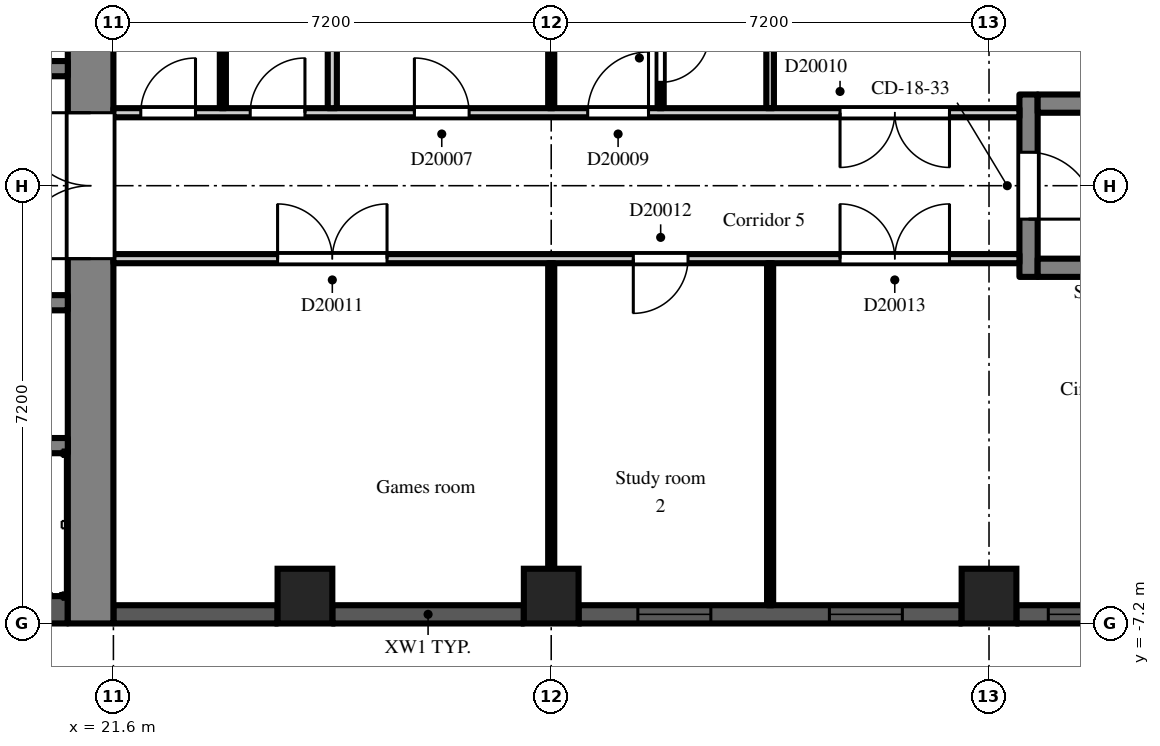
"""IFC4 building model, lengths in metres.
Left out: names, types, materials, properties, quantities, classifications, styles, units other than length and angle.
Written with IfcOpenShell. Run it as: python <this file> out.ifc"""

import sys

from ifc_helpers import new_model, si_unit, direction, frame, frame_2d, origin, origin_2d, place, context, subcontext, project, spatial, rectangle, extrude, element, fill, save


model = new_model("IFC4")
c1 = context("Model", 3, precision=1e-05, world=origin(), true_north=direction((0.0, 1.0)))
c2 = subcontext(c1, "Body", "Model", "MODEL_VIEW")
j1 = project(units=[si_unit("LENGTHUNIT", "METRE"), si_unit("PLANEANGLEUNIT", "RADIAN")], contexts=[c1])
p1 = place(None, origin())
s1 = spatial("IfcSite", under=j1, at=p1, CompositionType="ELEMENT")
p2 = place(p1, origin())
s2 = spatial("IfcBuilding", under=s1, at=p2, CompositionType="ELEMENT")
p3 = place(p2, frame((0.0, 0.0, 138.3)))
s3 = spatial("IfcBuildingStorey", under=s2, at=p3, CompositionType="ELEMENT", Elevation=138.3)
for number, where, z_axis, x_axis in (
    (1, (24.75, -6.75, 0.0), (0.0, 0.0, 1.0), (1.0, 0.0, 0.0)),
    (2, (28.8, -6.75, 0.0), (0.0, 0.0, 1.0), (1.0, 0.0, 0.0)),
    (3, (36.0, -6.75, 0.0), (0.0, 0.0, 1.0), (1.0, 0.0, 0.0)),
):
    element("IfcColumn", number, at=place(p3, frame(where, z_axis=z_axis, x_axis=x_axis)), inside=s3, PredefinedType="COLUMN", context=c2, shape_type="SweptSolid", body=[
        extrude(rectangle(XDim=0.9, YDim=0.9, at=origin_2d()), origin(), (0.0, 0.0, 1.0), 3.0),
    ])
p4 = place(p3, frame((21.6, -7.05, 0.0), z_axis=(0.0, 0.0, 1.0), x_axis=(1.0, 0.0, 0.0)))
e4 = element("IfcWall", 4, at=p4, inside=s3, PredefinedType="SOLIDWALL", context=c2, shape_type="SweptSolid", body=[
    extrude(rectangle(XDim=2.7, YDim=0.3, at=frame_2d((1.35, 0.0))), origin(), (0.0, 0.0, 1.0), 2.2),
])
p5 = place(p3, frame((25.2, -7.05, 0.0), z_axis=(0.0, 0.0, 1.0), x_axis=(1.0, 0.0, 0.0)))
e5 = element("IfcWall", 5, at=p5, inside=s3, PredefinedType="SOLIDWALL", context=c2, shape_type="SweptSolid", body=[
    extrude(rectangle(XDim=3.15, YDim=0.3, at=frame_2d((1.575, 0.0))), origin(), (0.0, 0.0, 1.0), 2.2),
])
p6 = place(p3, frame((29.25, -7.05, 0.0), z_axis=(0.0, 0.0, 1.0), x_axis=(1.0, 0.0, 0.0)))
e6 = element("IfcWall", 6, at=p6, inside=s3, PredefinedType="SOLIDWALL", context=c2, shape_type="SweptSolid", body=[
    extrude(rectangle(XDim=6.3, YDim=0.3, at=frame_2d((3.15, 0.0))), origin(), (0.0, 0.0, 1.0), 2.2),
])
p7 = place(p6, frame((0.975, 0.0, 0.2)))
e7 = element("IfcOpeningElement", 7, at=p7, cuts=e6, PredefinedType="OPENING", context=c2, shape_type="SweptSolid", body=[
    extrude(rectangle(XDim=1.2, YDim=1.85, at=frame_2d((0.6, 0.925))), frame((0.0, 0.16, 0.0), z_axis=(0.0, -1.0, 0.0), x_axis=(1.0, 0.0, 0.0)), (0.0, 0.0, 1.0), 0.32),
])
p8 = place(p6, frame((4.125, 0.0, 0.2)))
e8 = element("IfcOpeningElement", 8, at=p8, cuts=e6, PredefinedType="OPENING", context=c2, shape_type="SweptSolid", body=[
    extrude(rectangle(XDim=1.2, YDim=1.85, at=frame_2d((0.6, 0.925))), frame((0.0, 0.16, 0.0), z_axis=(0.0, -1.0, 0.0), x_axis=(1.0, 0.0, 0.0)), (0.0, 0.0, 1.0), 0.32),
])
p9 = place(p3, frame((36.45, -7.05, 0.0), z_axis=(0.0, 0.0, 1.0), x_axis=(1.0, 0.0, 0.0)))
e9 = element("IfcWall", 9, at=p9, inside=s3, PredefinedType="SOLIDWALL", context=c2, shape_type="SweptSolid", body=[
    extrude(rectangle(XDim=2.25, YDim=0.3, at=frame_2d((1.125, 0.0))), origin(), (0.0, 0.0, 1.0), 2.2),
])
p10 = place(p9, frame((0.525, 0.0, 0.2)))
e10 = element("IfcOpeningElement", 10, at=p10, cuts=e9, PredefinedType="OPENING", context=c2, shape_type="SweptSolid", body=[
    extrude(rectangle(XDim=1.2, YDim=1.85, at=frame_2d((0.6, 0.925))), frame((0.0, 0.16, 0.0), z_axis=(0.0, -1.0, 0.0), x_axis=(1.0, 0.0, 0.0)), (0.0, 0.0, 1.0), 0.32),
])
p11 = place(p3, frame((21.225, -7.2, 0.0), z_axis=(0.0, 0.0, 1.0), x_axis=(0.0, 1.0, 0.0)))
e11 = element("IfcWall", 11, at=p11, inside=s3, PredefinedType="SHEAR", context=c2, shape_type="SweptSolid", body=[
    extrude(rectangle(XDim=14.4, YDim=0.75, at=frame_2d((7.2, 0.0))), origin(), (0.0, 0.0, 1.0), 2.6),
])
p12 = place(p11, frame((6.0, 0.0, 0.0)))
e12 = element("IfcOpeningElement", 12, at=p12, cuts=e11, PredefinedType="OPENING", context=c2, shape_type="SweptSolid", body=[
    extrude(rectangle(XDim=2.4, YDim=2.2, at=frame_2d((1.2, 1.1))), frame((0.0, 0.385, 0.0), z_axis=(0.0, -1.0, 0.0), x_axis=(1.0, 0.0, 0.0)), (0.0, 0.0, 1.0), 0.77),
])
p13 = place(p3, frame((7.9, 1.925, 0.0), z_axis=(0.0, 0.0, 1.0), x_axis=(1.0, 0.0, 0.0)))
e13 = element("IfcWall", 13, at=p13, inside=s3, PredefinedType="SHEAR", context=c2, shape_type="SweptSolid", body=[
    extrude(rectangle(XDim=12.95, YDim=0.25, at=frame_2d((6.475, 0.0))), origin(), (0.0, 0.0, 1.0), 2.6),
])
p14 = place(p13, frame((4.825, 0.0, 0.0)))
e14 = element("IfcOpeningElement", 14, at=p14, cuts=e13, PredefinedType="OPENING", context=c2, shape_type="SweptSolid", body=[
    extrude(rectangle(XDim=1.1, YDim=2.1, at=frame_2d((0.55, 1.05))), frame((0.0, 0.135, 0.0), z_axis=(0.0, -1.0, 0.0), x_axis=(1.0, 0.0, 0.0)), (0.0, 0.0, 1.0), 0.27),
])
p15 = place(p13, frame((7.025, 0.0, 0.0)))
e15 = element("IfcOpeningElement", 15, at=p15, cuts=e13, PredefinedType="OPENING", context=c2, shape_type="SweptSolid", body=[
    extrude(rectangle(XDim=1.1, YDim=2.1, at=frame_2d((0.55, 1.05))), frame((0.0, 0.135, 0.0), z_axis=(0.0, -1.0, 0.0), x_axis=(1.0, 0.0, 0.0)), (0.0, 0.0, 1.0), 0.27),
])
p16 = place(p13, frame((9.225, 0.0, 0.0)))
e16 = element("IfcOpeningElement", 16, at=p16, cuts=e13, PredefinedType="OPENING", context=c2, shape_type="SweptSolid", body=[
    extrude(rectangle(XDim=1.1, YDim=2.1, at=frame_2d((0.55, 1.05))), frame((0.0, 0.135, 0.0), z_axis=(0.0, -1.0, 0.0), x_axis=(1.0, 0.0, 0.0)), (0.0, 0.0, 1.0), 0.27),
])
p17 = place(p13, frame((0.525, 0.0, 0.0)))
e17 = element("IfcOpeningElement", 17, at=p17, cuts=e13, PredefinedType="OPENING", context=c2, shape_type="SweptSolid", body=[
    extrude(rectangle(XDim=0.9, YDim=2.1, at=frame_2d((0.45, 1.05))), frame((0.0, 0.135, 0.0), z_axis=(0.0, -1.0, 0.0), x_axis=(1.0, 0.0, 0.0)), (0.0, 0.0, 1.0), 0.27),
])
p18 = place(p13, frame((2.625, 0.0, 0.0)))
e18 = element("IfcOpeningElement", 18, at=p18, cuts=e13, PredefinedType="OPENING", context=c2, shape_type="SweptSolid", body=[
    extrude(rectangle(XDim=1.1, YDim=2.1, at=frame_2d((0.55, 1.05))), frame((0.0, 0.135, 0.0), z_axis=(0.0, -1.0, 0.0), x_axis=(1.0, 0.0, 0.0)), (0.0, 0.0, 1.0), 0.27),
])
p19 = place(p13, frame((11.525, 0.0, 0.0)))
e19 = element("IfcOpeningElement", 19, at=p19, cuts=e13, PredefinedType="OPENING", context=c2, shape_type="SweptSolid", body=[
    extrude(rectangle(XDim=0.9, YDim=2.1, at=frame_2d((0.45, 1.05))), frame((0.0, 0.135, 0.0), z_axis=(0.0, -1.0, 0.0), x_axis=(1.0, 0.0, 0.0)), (0.0, 0.0, 1.0), 0.27),
])
p20 = place(p3, frame((7.9, -6.975, 0.0), z_axis=(0.0, 0.0, 1.0), x_axis=(1.0, 0.0, 0.0)))
e20 = element("IfcWall", 20, at=p20, inside=s3, PredefinedType="SHEAR", context=c2, shape_type="SweptSolid", body=[
    extrude(rectangle(XDim=12.95, YDim=0.45, at=frame_2d((6.475, 0.0))), origin(), (0.0, 0.0, 1.0), 2.6),
])
p21 = place(p3, frame((7.9, -1.925, 0.0), z_axis=(0.0, 0.0, 1.0), x_axis=(1.0, 0.0, 0.0)))
e21 = element("IfcWall", 21, at=p21, inside=s3, PredefinedType="SHEAR", context=c2, shape_type="SweptSolid", body=[
    extrude(rectangle(XDim=12.95, YDim=0.25, at=frame_2d((6.475, 0.0))), origin(), (0.0, 0.0, 1.0), 2.6),
])
p22 = place(p21, frame((0.525, 0.0, 0.0)))
e22 = element("IfcOpeningElement", 22, at=p22, cuts=e21, PredefinedType="OPENING", context=c2, shape_type="SweptSolid", body=[
    extrude(rectangle(XDim=0.9, YDim=2.1, at=frame_2d((0.45, 1.05))), frame((0.0, 0.135, 0.0), z_axis=(0.0, -1.0, 0.0), x_axis=(1.0, 0.0, 0.0)), (0.0, 0.0, 1.0), 0.27),
])
p23 = place(p21, frame((2.625, 0.0, 0.0)))
e23 = element("IfcOpeningElement", 23, at=p23, cuts=e21, PredefinedType="OPENING", context=c2, shape_type="SweptSolid", body=[
    extrude(rectangle(XDim=1.1, YDim=2.1, at=frame_2d((0.55, 1.05))), frame((0.0, 0.135, 0.0), z_axis=(0.0, -1.0, 0.0), x_axis=(1.0, 0.0, 0.0)), (0.0, 0.0, 1.0), 0.27),
])
p24 = place(p21, frame((6.025, 0.0, 0.0)))
e24 = element("IfcOpeningElement", 24, at=p24, cuts=e21, PredefinedType="OPENING", context=c2, shape_type="SweptSolid", body=[
    extrude(rectangle(XDim=0.9, YDim=2.1, at=frame_2d((0.45, 1.05))), frame((0.0, 0.135, 0.0), z_axis=(0.0, -1.0, 0.0), x_axis=(1.0, 0.0, 0.0)), (0.0, 0.0, 1.0), 0.27),
])
p25 = place(p21, frame((10.425, 0.0, 0.0)))
e25 = element("IfcOpeningElement", 25, at=p25, cuts=e21, PredefinedType="OPENING", context=c2, shape_type="SweptSolid", body=[
    extrude(rectangle(XDim=0.9, YDim=2.1, at=frame_2d((0.45, 1.05))), frame((0.0, 0.135, 0.0), z_axis=(0.0, -1.0, 0.0), x_axis=(1.0, 0.0, 0.0)), (0.0, 0.0, 1.0), 0.27),
])
p26 = place(p3, frame((12.3, -4.275, 0.0), z_axis=(0.0, 0.0, 1.0), x_axis=(1.0, 0.0, 0.0)))
e26 = element("IfcWall", 26, at=p26, inside=s3, PredefinedType="SHEAR", context=c2, shape_type="SweptSolid", body=[
    extrude(rectangle(XDim=8.55, YDim=0.25, at=frame_2d((4.275, 0.0))), origin(), (0.0, 0.0, 1.0), 2.6),
])
p27 = place(p3, frame((36.65, -1.5, 0.0), z_axis=(0.0, 0.0, 1.0), x_axis=(0.0, 1.0, 0.0)))
e27 = element("IfcWall", 27, at=p27, inside=s3, PredefinedType="SHEAR", context=c2, shape_type="SweptSolid", body=[
    extrude(rectangle(XDim=3.0, YDim=0.3, at=frame_2d((1.5, 0.0))), origin(), (0.0, 0.0, 1.0), 2.6),
])
p28 = place(p27, frame((0.95, 0.0, 0.0)))
e28 = element("IfcOpeningElement", 28, at=p28, cuts=e27, PredefinedType="OPENING", context=c2, shape_type="SweptSolid", body=[
    extrude(rectangle(XDim=1.1, YDim=2.1, at=frame_2d((0.55, 1.05))), frame((0.0, 0.16, 0.0), z_axis=(0.0, -1.0, 0.0), x_axis=(1.0, 0.0, 0.0)), (0.0, 0.0, 1.0), 0.32),
])
for number, where, z_axis, x_axis in (
    (29, (36.8, -1.35, 0.0), (0.0, 0.0, 1.0), (1.0, 0.0, 0.0)),
    (30, (36.8, 1.35, 0.0), (0.0, 0.0, 1.0), (1.0, 0.0, 0.0)),
):
    element("IfcWall", number, at=place(p3, frame(where, z_axis=z_axis, x_axis=x_axis)), inside=s3, PredefinedType="SHEAR", context=c2, shape_type="SweptSolid", body=[
        extrude(rectangle(XDim=5.8, YDim=0.3, at=frame_2d((2.9, 0.0))), origin(), (0.0, 0.0, 1.0), 2.6),
    ])
p29 = place(p3, frame((21.6, -1.2, 0.0), z_axis=(0.0, 0.0, 1.0), x_axis=(1.0, 0.0, 0.0)))
e31 = element("IfcWall", 31, at=p29, inside=s3, PredefinedType="PARTITIONING", context=c2, shape_type="SweptSolid", body=[
    extrude(rectangle(XDim=14.9, YDim=0.15, at=frame_2d((7.45, 0.0))), origin(), (0.0, 0.0, 1.0), 2.6),
])
p30 = place(p29, frame((2.7, 0.0, 0.0)))
e32 = element("IfcOpeningElement", 32, at=p30, cuts=e31, PredefinedType="OPENING", context=c2, shape_type="SweptSolid", body=[
    extrude(rectangle(XDim=1.8, YDim=2.1, at=frame_2d((0.9, 1.05))), frame((0.0, 0.085, 0.0), z_axis=(0.0, -1.0, 0.0), x_axis=(1.0, 0.0, 0.0)), (0.0, 0.0, 1.0), 0.17),
])
p31 = place(p29, frame((8.55, 0.0, 0.0)))
e33 = element("IfcOpeningElement", 33, at=p31, cuts=e31, PredefinedType="OPENING", context=c2, shape_type="SweptSolid", body=[
    extrude(rectangle(XDim=0.9, YDim=2.1, at=frame_2d((0.45, 1.05))), frame((0.0, 0.085, 0.0), z_axis=(0.0, -1.0, 0.0), x_axis=(1.0, 0.0, 0.0)), (0.0, 0.0, 1.0), 0.17),
])
p32 = place(p29, frame((11.95, 0.0, 0.0)))
e34 = element("IfcOpeningElement", 34, at=p32, cuts=e31, PredefinedType="OPENING", context=c2, shape_type="SweptSolid", body=[
    extrude(rectangle(XDim=1.8, YDim=2.1, at=frame_2d((0.9, 1.05))), frame((0.0, 0.085, 0.0), z_axis=(0.0, -1.0, 0.0), x_axis=(1.0, 0.0, 0.0)), (0.0, 0.0, 1.0), 0.17),
])
p33 = place(p3, frame((21.6, 1.2, 0.0), z_axis=(0.0, 0.0, 1.0), x_axis=(1.0, 0.0, 0.0)))
e35 = element("IfcWall", 35, at=p33, inside=s3, PredefinedType="PARTITIONING", context=c2, shape_type="SweptSolid", body=[
    extrude(rectangle(XDim=14.9, YDim=0.15, at=frame_2d((7.45, 0.0))), origin(), (0.0, 0.0, 1.0), 2.6),
])
p34 = place(p33, frame((0.45, 0.0, 0.0)))
e36 = element("IfcOpeningElement", 36, at=p34, cuts=e35, PredefinedType="OPENING", context=c2, shape_type="SweptSolid", body=[
    extrude(rectangle(XDim=0.9, YDim=2.1, at=frame_2d((0.45, 1.05))), frame((0.0, 0.085, 0.0), z_axis=(0.0, -1.0, 0.0), x_axis=(1.0, 0.0, 0.0)), (0.0, 0.0, 1.0), 0.17),
])
p35 = place(p33, frame((2.25, 0.0, 0.0)))
e37 = element("IfcOpeningElement", 37, at=p35, cuts=e35, PredefinedType="OPENING", context=c2, shape_type="SweptSolid", body=[
    extrude(rectangle(XDim=0.9, YDim=2.1, at=frame_2d((0.45, 1.05))), frame((0.0, 0.085, 0.0), z_axis=(0.0, -1.0, 0.0), x_axis=(1.0, 0.0, 0.0)), (0.0, 0.0, 1.0), 0.17),
])
p36 = place(p33, frame((4.95, 0.0, 0.0)))
e38 = element("IfcOpeningElement", 38, at=p36, cuts=e35, PredefinedType="OPENING", context=c2, shape_type="SweptSolid", body=[
    extrude(rectangle(XDim=0.9, YDim=2.1, at=frame_2d((0.45, 1.05))), frame((0.0, 0.085, 0.0), z_axis=(0.0, -1.0, 0.0), x_axis=(1.0, 0.0, 0.0)), (0.0, 0.0, 1.0), 0.17),
])
p37 = place(p33, frame((7.8, 0.0, 0.0)))
e39 = element("IfcOpeningElement", 39, at=p37, cuts=e35, PredefinedType="OPENING", context=c2, shape_type="SweptSolid", body=[
    extrude(rectangle(XDim=1.0, YDim=2.1, at=frame_2d((0.5, 1.05))), frame((0.0, 0.085, 0.0), z_axis=(0.0, -1.0, 0.0), x_axis=(1.0, 0.0, 0.0)), (0.0, 0.0, 1.0), 0.17),
])
p38 = place(p33, frame((11.95, 0.0, 0.0)))
e40 = element("IfcOpeningElement", 40, at=p38, cuts=e35, PredefinedType="OPENING", context=c2, shape_type="SweptSolid", body=[
    extrude(rectangle(XDim=1.8, YDim=2.1, at=frame_2d((0.9, 1.05))), frame((0.0, 0.085, 0.0), z_axis=(0.0, -1.0, 0.0), x_axis=(1.0, 0.0, 0.0)), (0.0, 0.0, 1.0), 0.17),
])
p39 = place(p3, frame((23.4, 1.275, 0.0), z_axis=(0.0, 0.0, 1.0), x_axis=(0.0, 1.0, 0.0)))
e41 = element("IfcWall", 41, at=p39, inside=s3, PredefinedType="PARTITIONING", context=c2, shape_type="SweptSolid", body=[
    extrude(rectangle(XDim=5.625, YDim=0.1, at=frame_2d((2.812, 0.0))), origin(), (0.0, 0.0, 1.0), 2.6),
])
p40 = place(p3, frame((25.2, 1.275, 0.0), z_axis=(0.0, 0.0, 1.0), x_axis=(0.0, 1.0, 0.0)))
e42 = element("IfcWall", 42, at=p40, inside=s3, PredefinedType="PARTITIONING", context=c2, shape_type="SweptSolid", body=[
    extrude(rectangle(XDim=5.625, YDim=0.15, at=frame_2d((2.812, 0.0))), origin(), (0.0, 0.0, 1.0), 2.6),
])
for number, where, z_axis, x_axis in (
    (43, (28.8, -6.9, 0.0), (0.0, 0.0, 1.0), (0.0, 1.0, 0.0)),
    (44, (28.8, 1.275, 0.0), (0.0, 0.0, 1.0), (0.0, 1.0, 0.0)),
):
    element("IfcWall", number, at=place(p3, frame(where, z_axis=z_axis, x_axis=x_axis)), inside=s3, PredefinedType="PARTITIONING", context=c2, shape_type="SweptSolid", body=[
        extrude(rectangle(XDim=5.625, YDim=0.1, at=frame_2d((2.812, 0.0))), origin(), (0.0, 0.0, 1.0), 2.6),
    ])
p41 = place(p3, frame((30.6, 1.275, 0.0), z_axis=(0.0, 0.0, 1.0), x_axis=(0.0, 1.0, 0.0)))
e45 = element("IfcWall", 45, at=p41, inside=s3, PredefinedType="PARTITIONING", context=c2, shape_type="SweptSolid", body=[
    extrude(rectangle(XDim=1.775, YDim=0.1, at=frame_2d((0.888, 0.0))), origin(), (0.0, 0.0, 1.0), 2.6),
])
p42 = place(p41, frame((0.425, 0.0, 0.0)))
e46 = element("IfcOpeningElement", 46, at=p42, cuts=e45, PredefinedType="OPENING", context=c2, shape_type="SweptSolid", body=[
    extrude(rectangle(XDim=0.8, YDim=2.1, at=frame_2d((0.4, 1.05))), frame((0.0, 0.06, 0.0), z_axis=(0.0, -1.0, 0.0), x_axis=(1.0, 0.0, 0.0)), (0.0, 0.0, 1.0), 0.12),
])
p43 = place(p3, frame((32.4, -6.9, 0.0), z_axis=(0.0, 0.0, 1.0), x_axis=(0.0, 1.0, 0.0)))
e47 = element("IfcWall", 47, at=p43, inside=s3, PredefinedType="PARTITIONING", context=c2, shape_type="SweptSolid", body=[
    extrude(rectangle(XDim=5.625, YDim=0.1, at=frame_2d((2.812, 0.0))), origin(), (0.0, 0.0, 1.0), 2.6),
])
p44 = place(p3, frame((32.4, 1.275, 0.0), z_axis=(0.0, 0.0, 1.0), x_axis=(0.0, 1.0, 0.0)))
e48 = element("IfcWall", 48, at=p44, inside=s3, PredefinedType="PARTITIONING", context=c2, shape_type="SweptSolid", body=[
    extrude(rectangle(XDim=1.725, YDim=0.125, at=frame_2d((0.863, 0.0))), origin(), (0.0, 0.0, 1.0), 2.6),
])
p45 = place(p7, origin())
e49 = element("IfcWindow", 49, at=p45, inside=s3, PartitioningType="SINGLE_PANEL", PredefinedType="WINDOW", context=c2, shape_type="SweptSolid", body=[
    extrude(rectangle(XDim=1.2, YDim=1.85, at=frame_2d((0.6, 0.925))), frame((0.0, 0.03, 0.0), z_axis=(0.0, -1.0, 0.0), x_axis=(1.0, 0.0, 0.0)), (0.0, 0.0, 1.0), 0.06),
])
fill(e7, e49)
p46 = place(p8, origin())
e50 = element("IfcWindow", 50, at=p46, inside=s3, PartitioningType="SINGLE_PANEL", PredefinedType="WINDOW", context=c2, shape_type="SweptSolid", body=[
    extrude(rectangle(XDim=1.2, YDim=1.85, at=frame_2d((0.6, 0.925))), frame((0.0, 0.03, 0.0), z_axis=(0.0, -1.0, 0.0), x_axis=(1.0, 0.0, 0.0)), (0.0, 0.0, 1.0), 0.06),
])
fill(e8, e50)
p47 = place(p10, origin())
e51 = element("IfcWindow", 51, at=p47, inside=s3, PartitioningType="SINGLE_PANEL", PredefinedType="WINDOW", context=c2, shape_type="SweptSolid", body=[
    extrude(rectangle(XDim=1.2, YDim=1.85, at=frame_2d((0.6, 0.925))), frame((0.0, 0.03, 0.0), z_axis=(0.0, -1.0, 0.0), x_axis=(1.0, 0.0, 0.0)), (0.0, 0.0, 1.0), 0.06),
])
fill(e10, e51)
p48 = place(p12, origin())
e52 = element("IfcDoor", 52, at=p48, inside=s3, OperationType="DOUBLE_DOOR_DOUBLE_SWING", PredefinedType="DOOR", context=c2, shape_type="SweptSolid", body=[
    extrude(rectangle(XDim=2.4, YDim=2.2, at=frame_2d((1.2, 1.1))), frame((0.0, 0.025, 0.0), z_axis=(0.0, -1.0, 0.0), x_axis=(1.0, 0.0, 0.0)), (0.0, 0.0, 1.0), 0.05),
])
fill(e12, e52)
p49 = place(p28, frame((1.1, 0.0, 0.0), z_axis=(0.0, 0.0, 1.0), x_axis=(-1.0, 0.0, 0.0)))
e53 = element("IfcDoor", 53, at=p49, inside=s3, OperationType="SINGLE_SWING_RIGHT", PredefinedType="DOOR", context=c2, shape_type="SweptSolid", body=[
    extrude(rectangle(XDim=1.1, YDim=2.1, at=frame_2d((0.55, 1.05))), frame((0.0, 0.025, 0.0), z_axis=(0.0, -1.0, 0.0), x_axis=(1.0, 0.0, 0.0)), (0.0, 0.0, 1.0), 0.05),
])
fill(e28, e53)
p50 = place(p34, origin())
e54 = element("IfcDoor", 54, at=p50, inside=s3, OperationType="SINGLE_SWING_RIGHT", PredefinedType="DOOR", context=c2, shape_type="SweptSolid", body=[
    extrude(rectangle(XDim=0.9, YDim=2.1, at=frame_2d((0.45, 1.05))), frame((0.0, 0.025, 0.0), z_axis=(0.0, -1.0, 0.0), x_axis=(1.0, 0.0, 0.0)), (0.0, 0.0, 1.0), 0.05),
])
fill(e36, e54)
p51 = place(p35, origin())
e55 = element("IfcDoor", 55, at=p51, inside=s3, OperationType="SINGLE_SWING_RIGHT", PredefinedType="DOOR", context=c2, shape_type="SweptSolid", body=[
    extrude(rectangle(XDim=0.9, YDim=2.1, at=frame_2d((0.45, 1.05))), frame((0.0, 0.025, 0.0), z_axis=(0.0, -1.0, 0.0), x_axis=(1.0, 0.0, 0.0)), (0.0, 0.0, 1.0), 0.05),
])
fill(e37, e55)
p52 = place(p36, origin())
e56 = element("IfcDoor", 56, at=p52, inside=s3, OperationType="SINGLE_SWING_LEFT", PredefinedType="DOOR", context=c2, shape_type="SweptSolid", body=[
    extrude(rectangle(XDim=0.9, YDim=2.1, at=frame_2d((0.45, 1.05))), frame((0.0, 0.025, 0.0), z_axis=(0.0, -1.0, 0.0), x_axis=(1.0, 0.0, 0.0)), (0.0, 0.0, 1.0), 0.05),
])
fill(e38, e56)
p53 = place(p42, frame((0.8, 0.0, 0.0), z_axis=(0.0, 0.0, 1.0), x_axis=(-1.0, 0.0, 0.0)))
e57 = element("IfcDoor", 57, at=p53, inside=s3, OperationType="SINGLE_SWING_LEFT", PredefinedType="DOOR", context=c2, shape_type="SweptSolid", body=[
    extrude(rectangle(XDim=0.8, YDim=2.1, at=frame_2d((0.4, 1.05))), frame((0.0, 0.025, 0.0), z_axis=(0.0, -1.0, 0.0), x_axis=(1.0, 0.0, 0.0)), (0.0, 0.0, 1.0), 0.05),
])
fill(e46, e57)
p54 = place(p37, origin())
e58 = element("IfcDoor", 58, at=p54, inside=s3, OperationType="SINGLE_SWING_RIGHT", PredefinedType="DOOR", context=c2, shape_type="SweptSolid", body=[
    extrude(rectangle(XDim=1.0, YDim=2.1, at=frame_2d((0.5, 1.05))), frame((0.0, 0.025, 0.0), z_axis=(0.0, -1.0, 0.0), x_axis=(1.0, 0.0, 0.0)), (0.0, 0.0, 1.0), 0.05),
])
fill(e39, e58)
p55 = place(p38, frame((1.8, 0.0, 0.0), z_axis=(0.0, 0.0, 1.0), x_axis=(-1.0, 0.0, 0.0)))
e59 = element("IfcDoor", 59, at=p55, inside=s3, OperationType="DOUBLE_DOOR_DOUBLE_SWING", PredefinedType="DOOR", context=c2, shape_type="SweptSolid", body=[
    extrude(rectangle(XDim=1.8, YDim=2.1, at=frame_2d((0.9, 1.05))), frame((0.0, 0.025, 0.0), z_axis=(0.0, -1.0, 0.0), x_axis=(1.0, 0.0, 0.0)), (0.0, 0.0, 1.0), 0.05),
])
fill(e40, e59)
p56 = place(p30, origin())
e60 = element("IfcDoor", 60, at=p56, inside=s3, OperationType="DOUBLE_DOOR_DOUBLE_SWING", PredefinedType="DOOR", context=c2, shape_type="SweptSolid", body=[
    extrude(rectangle(XDim=1.8, YDim=2.1, at=frame_2d((0.9, 1.05))), frame((0.0, 0.025, 0.0), z_axis=(0.0, -1.0, 0.0), x_axis=(1.0, 0.0, 0.0)), (0.0, 0.0, 1.0), 0.05),
])
fill(e32, e60)
p57 = place(p31, frame((0.9, 0.0, 0.0), z_axis=(0.0, 0.0, 1.0), x_axis=(-1.0, 0.0, 0.0)))
e61 = element("IfcDoor", 61, at=p57, inside=s3, OperationType="SINGLE_SWING_RIGHT", PredefinedType="DOOR", context=c2, shape_type="SweptSolid", body=[
    extrude(rectangle(XDim=0.9, YDim=2.1, at=frame_2d((0.45, 1.05))), frame((0.0, 0.025, 0.0), z_axis=(0.0, -1.0, 0.0), x_axis=(1.0, 0.0, 0.0)), (0.0, 0.0, 1.0), 0.05),
])
fill(e33, e61)
p58 = place(p32, origin())
e62 = element("IfcDoor", 62, at=p58, inside=s3, OperationType="DOUBLE_DOOR_DOUBLE_SWING", PredefinedType="DOOR", context=c2, shape_type="SweptSolid", body=[
    extrude(rectangle(XDim=1.8, YDim=2.1, at=frame_2d((0.9, 1.05))), frame((0.0, 0.025, 0.0), z_axis=(0.0, -1.0, 0.0), x_axis=(1.0, 0.0, 0.0)), (0.0, 0.0, 1.0), 0.05),
])
fill(e34, e62)
save(model, sys.argv[1])
